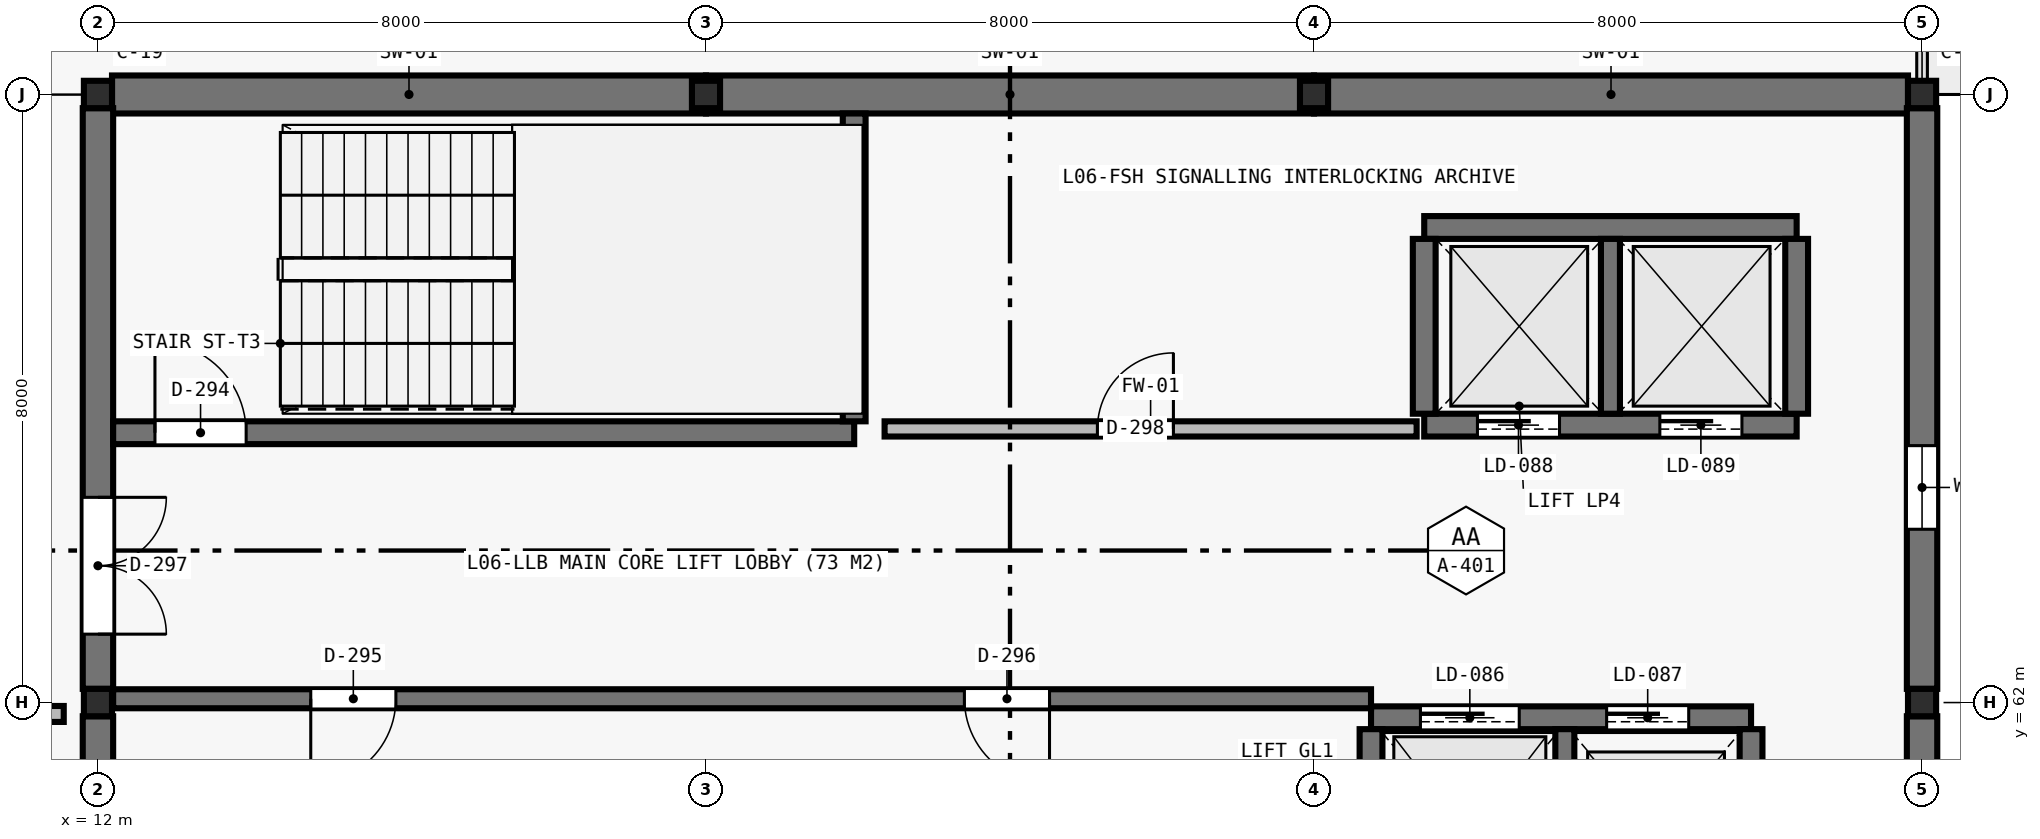
"""IFC4 building model, lengths in metres.
Left out: names, types, materials, properties, quantities, classifications, styles, units other than length and angle.
Written with IfcOpenShell. Run it as: python <this file> out.ifc"""

import sys

from ifc_helpers import new_model, si_unit, direction, frame, frame_2d, origin, origin_2d, place, context, subcontext, project, spatial, rectangle, i_section, extrude, element, fill, save


model = new_model("IFC4")
c1 = context("Model", 3, precision=1e-05, world=origin(), true_north=direction((0.0, 1.0)))
c2 = subcontext(c1, "Body", "Model", "MODEL_VIEW")
j1 = project(units=[si_unit("LENGTHUNIT", "METRE"), si_unit("PLANEANGLEUNIT", "RADIAN")], contexts=[c1])
p1 = place(None, origin())
s1 = spatial("IfcSite", under=j1, at=p1, CompositionType="ELEMENT")
p2 = place(p1, origin())
s2 = spatial("IfcBuilding", under=s1, at=p2, CompositionType="ELEMENT")
p3 = place(p2, frame((0.0, 0.0, 28.0)))
s3 = spatial("IfcBuildingStorey", under=s2, at=p3, CompositionType="ELEMENT", Elevation=28.0)
for number, where, z_axis, x_axis in (
    (1, (12.0, 62.0, 0.0), (0.0, 0.0, 1.0), (1.0, 0.0, 0.0)),
    (2, (12.0, 70.0, 0.0), (0.0, 0.0, 1.0), (1.0, 0.0, 0.0)),
    (3, (20.0, 70.0, 0.0), (0.0, 0.0, 1.0), (1.0, 0.0, 0.0)),
    (4, (28.0, 70.0, 0.0), (0.0, 0.0, 1.0), (1.0, 0.0, 0.0)),
    (5, (36.0, 62.0, 0.0), (0.0, 0.0, 1.0), (1.0, 0.0, 0.0)),
    (6, (36.0, 70.0, 0.0), (0.0, 0.0, 1.0), (1.0, 0.0, 0.0)),
):
    element("IfcColumn", number, at=place(p3, frame(where, z_axis=z_axis, x_axis=x_axis)), inside=s3, PredefinedType="COLUMN", context=c2, shape_type="SweptSolid", body=[
        extrude(i_section(OverallWidth=0.37, OverallDepth=0.36, WebThickness=0.012, FlangeThickness=0.02, at=origin_2d()), origin(), (0.0, 0.0, 1.0), 3.98),
    ])
p4 = place(p3, frame((12.185, 70.0, 0.0), z_axis=(0.0, 0.0, 1.0), x_axis=(1.0, 0.0, 0.0)))
e7 = element("IfcWall", 7, at=p4, inside=s3, PredefinedType="SHEAR", context=c2, shape_type="SweptSolid", body=[
    extrude(rectangle(XDim=7.815, YDim=0.5, at=frame_2d((3.907, 0.0))), origin(), (0.0, 0.0, 1.0), 3.98),
])
p5 = place(p3, frame((20.0, 70.0, 0.0), z_axis=(0.0, 0.0, 1.0), x_axis=(1.0, 0.0, 0.0)))
e8 = element("IfcWall", 8, at=p5, inside=s3, PredefinedType="SHEAR", context=c2, shape_type="SweptSolid", body=[
    extrude(rectangle(XDim=8.0, YDim=0.5, at=frame_2d((4.0, 0.0))), origin(), (0.0, 0.0, 1.0), 3.98),
])
p6 = place(p3, frame((28.0, 70.0, 0.0), z_axis=(0.0, 0.0, 1.0), x_axis=(1.0, 0.0, 0.0)))
e9 = element("IfcWall", 9, at=p6, inside=s3, PredefinedType="SHEAR", context=c2, shape_type="SweptSolid", body=[
    extrude(rectangle(XDim=7.815, YDim=0.5, at=frame_2d((3.907, 0.0))), origin(), (0.0, 0.0, 1.0), 3.98),
])
p7 = place(p3, frame((12.0, 54.18, 0.0), z_axis=(0.0, 0.0, 1.0), x_axis=(0.0, 1.0, 0.0)))
e10 = element("IfcWall", 10, at=p7, inside=s3, PredefinedType="SHEAR", context=c2, shape_type="SweptSolid", body=[
    extrude(rectangle(XDim=7.64, YDim=0.4, at=frame_2d((3.82, 0.0))), origin(), (0.0, 0.0, 1.0), 3.98),
])
p8 = place(p3, frame((12.0, 62.18, 0.0), z_axis=(0.0, 0.0, 1.0), x_axis=(0.0, 1.0, 0.0)))
e11 = element("IfcWall", 11, at=p8, inside=s3, PredefinedType="SHEAR", context=c2, shape_type="SweptSolid", body=[
    extrude(rectangle(XDim=7.64, YDim=0.4, at=frame_2d((3.82, 0.0))), origin(), (0.0, 0.0, 1.0), 3.98),
])
p9 = place(p8, frame((0.72, 0.0, 0.0)))
e12 = element("IfcOpeningElement", 12, at=p9, cuts=e11, PredefinedType="OPENING", context=c2, shape_type="SweptSolid", body=[
    extrude(rectangle(XDim=1.8, YDim=2.2, at=frame_2d((0.9, 1.1))), frame((0.0, 0.21, 0.0), z_axis=(0.0, -1.0, 0.0), x_axis=(1.0, 0.0, 0.0)), (0.0, 0.0, 1.0), 0.42),
])
p10 = place(p3, frame((36.0, 54.18, 0.0), z_axis=(0.0, 0.0, 1.0), x_axis=(0.0, 1.0, 0.0)))
e13 = element("IfcWall", 13, at=p10, inside=s3, PredefinedType="SHEAR", context=c2, shape_type="SweptSolid", body=[
    extrude(rectangle(XDim=7.64, YDim=0.4, at=frame_2d((3.82, 0.0))), origin(), (0.0, 0.0, 1.0), 3.98),
])
p11 = place(p3, frame((36.0, 62.18, 0.0), z_axis=(0.0, 0.0, 1.0), x_axis=(0.0, 1.0, 0.0)))
e14 = element("IfcWall", 14, at=p11, inside=s3, PredefinedType="SHEAR", context=c2, shape_type="SweptSolid", body=[
    extrude(rectangle(XDim=7.64, YDim=0.4, at=frame_2d((3.82, 0.0))), origin(), (0.0, 0.0, 1.0), 3.98),
])
p12 = place(p11, frame((2.1, 0.0, 0.95)))
e15 = element("IfcOpeningElement", 15, at=p12, cuts=e14, PredefinedType="OPENING", context=c2, shape_type="SweptSolid", body=[
    extrude(rectangle(XDim=1.1, YDim=2.3, at=frame_2d((0.55, 1.15))), frame((0.0, 0.21, 0.0), z_axis=(0.0, -1.0, 0.0), x_axis=(1.0, 0.0, 0.0)), (0.0, 0.0, 1.0), 0.42),
])
p13 = place(p3, frame((28.75, 61.8, 0.0), z_axis=(0.0, 0.0, 1.0), x_axis=(1.0, 0.0, 0.0)))
e16 = element("IfcWall", 16, at=p13, inside=s3, PredefinedType="SHEAR", context=c2, shape_type="SweptSolid", body=[
    extrude(rectangle(XDim=5.0, YDim=0.3, at=frame_2d((2.5, 0.0))), origin(), (0.0, 0.0, 1.0), 3.98),
])
p14 = place(p13, frame((0.65, 0.0, 0.0)))
e17 = element("IfcOpeningElement", 17, at=p14, cuts=e16, PredefinedType="OPENING", context=c2, shape_type="SweptSolid", body=[
    extrude(rectangle(XDim=1.3, YDim=2.3, at=frame_2d((0.65, 1.15))), frame((0.0, 0.16, 0.0), z_axis=(0.0, -1.0, 0.0), x_axis=(1.0, 0.0, 0.0)), (0.0, 0.0, 1.0), 0.32),
])
p15 = place(p13, frame((3.1, 0.0, 0.0)))
e18 = element("IfcOpeningElement", 18, at=p15, cuts=e16, PredefinedType="OPENING", context=c2, shape_type="SweptSolid", body=[
    extrude(rectangle(XDim=1.08, YDim=2.2, at=frame_2d((0.54, 1.1))), frame((0.0, 0.16, 0.0), z_axis=(0.0, -1.0, 0.0), x_axis=(1.0, 0.0, 0.0)), (0.0, 0.0, 1.0), 0.32),
])
for number, where, z_axis, x_axis in (
    (19, (28.75, 58.8, 0.0), (0.0, 0.0, 1.0), (0.0, 1.0, 0.0)),
    (20, (33.75, 58.8, 0.0), (0.0, 0.0, 1.0), (0.0, 1.0, 0.0)),
):
    element("IfcWall", number, at=place(p3, frame(where, z_axis=z_axis, x_axis=x_axis)), inside=s3, PredefinedType="SHEAR", context=c2, shape_type="SweptSolid", body=[
        extrude(rectangle(XDim=2.85, YDim=0.3, at=frame_2d((1.425, 0.0))), origin(), (0.0, 0.0, 1.0), 3.98),
    ])
p16 = place(p3, frame((31.3, 58.8, 0.0), z_axis=(0.0, 0.0, 1.0), x_axis=(0.0, 1.0, 0.0)))
e21 = element("IfcWall", 21, at=p16, inside=s3, PredefinedType="SHEAR", context=c2, shape_type="SweptSolid", body=[
    extrude(rectangle(XDim=2.85, YDim=0.25, at=frame_2d((1.425, 0.0))), origin(), (0.0, 0.0, 1.0), 3.98),
])
p17 = place(p3, frame((12.2, 62.05, 0.0), z_axis=(0.0, 0.0, 1.0), x_axis=(1.0, 0.0, 0.0)))
e22 = element("IfcWall", 22, at=p17, inside=s3, PredefinedType="SHEAR", context=c2, shape_type="SweptSolid", body=[
    extrude(rectangle(XDim=16.55, YDim=0.25, at=frame_2d((8.275, 0.0))), origin(), (0.0, 0.0, 1.0), 3.98),
])
p18 = place(p17, frame((2.6, 0.0, 0.0)))
e23 = element("IfcOpeningElement", 23, at=p18, cuts=e22, PredefinedType="OPENING", context=c2, shape_type="SweptSolid", body=[
    extrude(rectangle(XDim=1.12, YDim=2.22, at=frame_2d((0.56, 1.11))), frame((0.0, 0.135, 0.0), z_axis=(0.0, -1.0, 0.0), x_axis=(1.0, 0.0, 0.0)), (0.0, 0.0, 1.0), 0.27),
])
p19 = place(p17, frame((11.2, 0.0, 0.0)))
e24 = element("IfcOpeningElement", 24, at=p19, cuts=e22, PredefinedType="OPENING", context=c2, shape_type="SweptSolid", body=[
    extrude(rectangle(XDim=1.12, YDim=2.22, at=frame_2d((0.56, 1.11))), frame((0.0, 0.135, 0.0), z_axis=(0.0, -1.0, 0.0), x_axis=(1.0, 0.0, 0.0)), (0.0, 0.0, 1.0), 0.27),
])
p20 = place(p3, frame((12.2, 65.55, 0.0), z_axis=(0.0, 0.0, 1.0), x_axis=(1.0, 0.0, 0.0)))
e25 = element("IfcWall", 25, at=p20, inside=s3, PredefinedType="SHEAR", context=c2, shape_type="SweptSolid", body=[
    extrude(rectangle(XDim=9.75, YDim=0.3, at=frame_2d((4.875, 0.0))), origin(), (0.0, 0.0, 1.0), 3.98),
])
p21 = place(p20, frame((0.55, 0.0, 0.0)))
e26 = element("IfcOpeningElement", 26, at=p21, cuts=e25, PredefinedType="OPENING", context=c2, shape_type="SweptSolid", body=[
    extrude(rectangle(XDim=1.2, YDim=2.2, at=frame_2d((0.6, 1.1))), frame((0.0, 0.16, 0.0), z_axis=(0.0, -1.0, 0.0), x_axis=(1.0, 0.0, 0.0)), (0.0, 0.0, 1.0), 0.32),
])
p22 = place(p3, frame((21.95, 65.7, 0.0), z_axis=(0.0, 0.0, 1.0), x_axis=(0.0, 1.0, 0.0)))
e27 = element("IfcWall", 27, at=p22, inside=s3, PredefinedType="SHEAR", context=c2, shape_type="SweptSolid", body=[
    extrude(rectangle(XDim=4.05, YDim=0.3, at=frame_2d((2.025, 0.0))), origin(), (0.0, 0.0, 1.0), 3.98),
])
p23 = place(p3, frame((29.45, 65.65, 0.0), z_axis=(0.0, 0.0, 1.0), x_axis=(1.0, 0.0, 0.0)))
e28 = element("IfcWall", 28, at=p23, inside=s3, PredefinedType="SHEAR", context=c2, shape_type="SweptSolid", body=[
    extrude(rectangle(XDim=4.9, YDim=0.3, at=frame_2d((2.45, 0.0))), origin(), (0.0, 0.0, 1.0), 3.98),
])
p24 = place(p23, frame((0.7, 0.0, 0.0)))
e29 = element("IfcOpeningElement", 29, at=p24, cuts=e28, PredefinedType="OPENING", context=c2, shape_type="SweptSolid", body=[
    extrude(rectangle(XDim=1.08, YDim=2.2, at=frame_2d((0.54, 1.1))), frame((0.0, 0.16, 0.0), z_axis=(0.0, -1.0, 0.0), x_axis=(1.0, 0.0, 0.0)), (0.0, 0.0, 1.0), 0.32),
])
p25 = place(p23, frame((3.1, 0.0, 0.0)))
e30 = element("IfcOpeningElement", 30, at=p25, cuts=e28, PredefinedType="OPENING", context=c2, shape_type="SweptSolid", body=[
    extrude(rectangle(XDim=1.08, YDim=2.2, at=frame_2d((0.54, 1.1))), frame((0.0, 0.16, 0.0), z_axis=(0.0, -1.0, 0.0), x_axis=(1.0, 0.0, 0.0)), (0.0, 0.0, 1.0), 0.32),
])
p26 = place(p3, frame((29.45, 68.25, 0.0), z_axis=(0.0, 0.0, 1.0), x_axis=(1.0, 0.0, 0.0)))
e31 = element("IfcWall", 31, at=p26, inside=s3, PredefinedType="SHEAR", context=c2, shape_type="SweptSolid", body=[
    extrude(rectangle(XDim=4.9, YDim=0.3, at=frame_2d((2.45, 0.0))), origin(), (0.0, 0.0, 1.0), 3.98),
])
for number, where, z_axis, x_axis in (
    (32, (29.45, 65.8, 0.0), (0.0, 0.0, 1.0), (0.0, 1.0, 0.0)),
    (33, (34.35, 65.8, 0.0), (0.0, 0.0, 1.0), (0.0, 1.0, 0.0)),
):
    element("IfcWall", number, at=place(p3, frame(where, z_axis=z_axis, x_axis=x_axis)), inside=s3, PredefinedType="SHEAR", context=c2, shape_type="SweptSolid", body=[
        extrude(rectangle(XDim=2.3, YDim=0.3, at=frame_2d((1.15, 0.0))), origin(), (0.0, 0.0, 1.0), 3.98),
    ])
p27 = place(p3, frame((31.9, 65.8, 0.0), z_axis=(0.0, 0.0, 1.0), x_axis=(0.0, 1.0, 0.0)))
e34 = element("IfcWall", 34, at=p27, inside=s3, PredefinedType="SHEAR", context=c2, shape_type="SweptSolid", body=[
    extrude(rectangle(XDim=2.3, YDim=0.25, at=frame_2d((1.15, 0.0))), origin(), (0.0, 0.0, 1.0), 3.98),
])
p28 = place(p3, frame((22.35, 65.6, 0.0), z_axis=(0.0, 0.0, 1.0), x_axis=(1.0, 0.0, 0.0)))
e35 = element("IfcWall", 35, at=p28, inside=s3, PredefinedType="SOLIDWALL", context=c2, shape_type="SweptSolid", body=[
    extrude(rectangle(XDim=7.0, YDim=0.2, at=frame_2d((3.5, 0.0))), origin(), (0.0, 0.0, 1.0), 3.98),
])
p29 = place(p28, frame((2.8, 0.0, 0.0)))
e36 = element("IfcOpeningElement", 36, at=p29, cuts=e35, PredefinedType="OPENING", context=c2, shape_type="SweptSolid", body=[
    extrude(rectangle(XDim=1.0, YDim=2.15, at=frame_2d((0.5, 1.075))), frame((0.0, 0.11, 0.0), z_axis=(0.0, -1.0, 0.0), x_axis=(1.0, 0.0, 0.0)), (0.0, 0.0, 1.0), 0.22),
])
p30 = place(p3, frame((6.35, 61.85, 0.0), z_axis=(0.0, 0.0, 1.0), x_axis=(1.0, 0.0, 0.0)))
e37 = element("IfcWall", 37, at=p30, inside=s3, PredefinedType="PLUMBINGWALL", context=c2, shape_type="SweptSolid", body=[
    extrude(rectangle(XDim=5.2, YDim=0.21, at=frame_2d((2.6, 0.0))), origin(), (0.0, 0.0, 1.0), 3.98),
])
p31 = place(p30, frame((0.35, 0.0, 0.0)))
e38 = element("IfcOpeningElement", 38, at=p31, cuts=e37, PredefinedType="OPENING", context=c2, shape_type="SweptSolid", body=[
    extrude(rectangle(XDim=0.95, YDim=2.1, at=frame_2d((0.475, 1.05))), frame((0.0, 0.115, 0.0), z_axis=(0.0, -1.0, 0.0), x_axis=(1.0, 0.0, 0.0)), (0.0, 0.0, 1.0), 0.23),
])
p32 = place(p30, frame((2.1, 0.0, 0.0)))
e39 = element("IfcOpeningElement", 39, at=p32, cuts=e37, PredefinedType="OPENING", context=c2, shape_type="SweptSolid", body=[
    extrude(rectangle(XDim=0.9, YDim=2.1, at=frame_2d((0.45, 1.05))), frame((0.0, 0.115, 0.0), z_axis=(0.0, -1.0, 0.0), x_axis=(1.0, 0.0, 0.0)), (0.0, 0.0, 1.0), 0.23),
])
p33 = place(p30, frame((3.8, 0.0, 0.0)))
e40 = element("IfcOpeningElement", 40, at=p33, cuts=e37, PredefinedType="OPENING", context=c2, shape_type="SweptSolid", body=[
    extrude(rectangle(XDim=0.9, YDim=2.1, at=frame_2d((0.45, 1.05))), frame((0.0, 0.115, 0.0), z_axis=(0.0, -1.0, 0.0), x_axis=(1.0, 0.0, 0.0)), (0.0, 0.0, 1.0), 0.23),
])
p34 = place(p12, origin())
e41 = element("IfcWindow", 41, at=p34, inside=s3, PartitioningType="SINGLE_PANEL", PredefinedType="WINDOW", context=c2, shape_type="SweptSolid", body=[
    extrude(rectangle(XDim=1.1, YDim=2.3, at=frame_2d((0.55, 1.15))), frame((0.0, 0.03, 0.0), z_axis=(0.0, -1.0, 0.0), x_axis=(1.0, 0.0, 0.0)), (0.0, 0.0, 1.0), 0.06),
])
fill(e15, e41)
p35 = place(p21, origin())
e42 = element("IfcDoor", 42, at=p35, inside=s3, OperationType="SINGLE_SWING_LEFT", PredefinedType="DOOR", context=c2, shape_type="SweptSolid", body=[
    extrude(rectangle(XDim=1.2, YDim=2.2, at=frame_2d((0.6, 1.1))), frame((0.0, 0.025, 0.0), z_axis=(0.0, -1.0, 0.0), x_axis=(1.0, 0.0, 0.0)), (0.0, 0.0, 1.0), 0.05),
])
fill(e26, e42)
p36 = place(p14, origin())
e43 = element("IfcDoor", 43, at=p36, inside=s3, OperationType="SLIDING_TO_LEFT", PredefinedType="DOOR", context=c2, shape_type="SweptSolid", body=[
    extrude(rectangle(XDim=1.3, YDim=2.3, at=frame_2d((0.65, 1.15))), frame((0.0, 0.025, 0.0), z_axis=(0.0, -1.0, 0.0), x_axis=(1.0, 0.0, 0.0)), (0.0, 0.0, 1.0), 0.05),
])
fill(e17, e43)
p37 = place(p15, origin())
e44 = element("IfcDoor", 44, at=p37, inside=s3, OperationType="SLIDING_TO_LEFT", PredefinedType="DOOR", context=c2, shape_type="SweptSolid", body=[
    extrude(rectangle(XDim=1.08, YDim=2.2, at=frame_2d((0.54, 1.1))), frame((0.0, 0.025, 0.0), z_axis=(0.0, -1.0, 0.0), x_axis=(1.0, 0.0, 0.0)), (0.0, 0.0, 1.0), 0.05),
])
fill(e18, e44)
p38 = place(p24, origin())
e45 = element("IfcDoor", 45, at=p38, inside=s3, OperationType="SLIDING_TO_LEFT", PredefinedType="DOOR", context=c2, shape_type="SweptSolid", body=[
    extrude(rectangle(XDim=1.08, YDim=2.2, at=frame_2d((0.54, 1.1))), frame((0.0, 0.025, 0.0), z_axis=(0.0, -1.0, 0.0), x_axis=(1.0, 0.0, 0.0)), (0.0, 0.0, 1.0), 0.05),
])
fill(e29, e45)
p39 = place(p25, origin())
e46 = element("IfcDoor", 46, at=p39, inside=s3, OperationType="SLIDING_TO_LEFT", PredefinedType="DOOR", context=c2, shape_type="SweptSolid", body=[
    extrude(rectangle(XDim=1.08, YDim=2.2, at=frame_2d((0.54, 1.1))), frame((0.0, 0.025, 0.0), z_axis=(0.0, -1.0, 0.0), x_axis=(1.0, 0.0, 0.0)), (0.0, 0.0, 1.0), 0.05),
])
fill(e30, e46)
p40 = place(p18, frame((1.12, 0.0, 0.0), z_axis=(0.0, 0.0, 1.0), x_axis=(-1.0, 0.0, 0.0)))
e47 = element("IfcDoor", 47, at=p40, inside=s3, OperationType="SINGLE_SWING_RIGHT", PredefinedType="DOOR", context=c2, shape_type="SweptSolid", body=[
    extrude(rectangle(XDim=1.12, YDim=2.22, at=frame_2d((0.56, 1.11))), frame((0.0, 0.025, 0.0), z_axis=(0.0, -1.0, 0.0), x_axis=(1.0, 0.0, 0.0)), (0.0, 0.0, 1.0), 0.05),
])
fill(e23, e47)
p41 = place(p19, frame((1.12, 0.0, 0.0), z_axis=(0.0, 0.0, 1.0), x_axis=(-1.0, 0.0, 0.0)))
e48 = element("IfcDoor", 48, at=p41, inside=s3, OperationType="SINGLE_SWING_LEFT", PredefinedType="DOOR", context=c2, shape_type="SweptSolid", body=[
    extrude(rectangle(XDim=1.12, YDim=2.22, at=frame_2d((0.56, 1.11))), frame((0.0, 0.025, 0.0), z_axis=(0.0, -1.0, 0.0), x_axis=(1.0, 0.0, 0.0)), (0.0, 0.0, 1.0), 0.05),
])
fill(e24, e48)
p42 = place(p9, frame((1.8, 0.0, 0.0), z_axis=(0.0, 0.0, 1.0), x_axis=(-1.0, 0.0, 0.0)))
e49 = element("IfcDoor", 49, at=p42, inside=s3, OperationType="DOUBLE_DOOR_SINGLE_SWING", PredefinedType="DOOR", context=c2, shape_type="SweptSolid", body=[
    extrude(rectangle(XDim=1.8, YDim=2.2, at=frame_2d((0.9, 1.1))), frame((0.0, 0.025, 0.0), z_axis=(0.0, -1.0, 0.0), x_axis=(1.0, 0.0, 0.0)), (0.0, 0.0, 1.0), 0.05),
])
fill(e12, e49)
p43 = place(p29, origin())
e50 = element("IfcDoor", 50, at=p43, inside=s3, OperationType="SINGLE_SWING_RIGHT", PredefinedType="DOOR", context=c2, shape_type="SweptSolid", body=[
    extrude(rectangle(XDim=1.0, YDim=2.15, at=frame_2d((0.5, 1.075))), frame((0.0, 0.025, 0.0), z_axis=(0.0, -1.0, 0.0), x_axis=(1.0, 0.0, 0.0)), (0.0, 0.0, 1.0), 0.05),
])
fill(e36, e50)
save(model, sys.argv[1])
